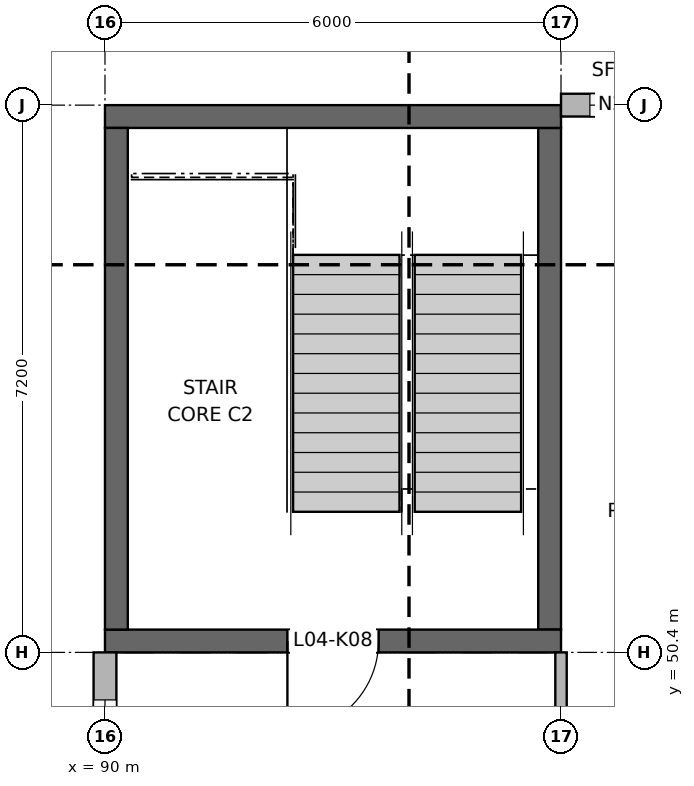
"""IFC4 building model, lengths in metres.
Left out: names, types, materials, properties, quantities, classifications, styles, units other than length and angle.
Written with IfcOpenShell. Run it as: python <this file> out.ifc"""

import sys

from ifc_helpers import new_model, si_unit, direction, frame, frame_2d, origin, place, context, subcontext, project, spatial, rectangle, extrude, element, fill, save


model = new_model("IFC4")
c1 = context("Model", 3, precision=1e-05, world=origin(), true_north=direction((0.0, 1.0)))
c2 = subcontext(c1, "Body", "Model", "MODEL_VIEW")
j1 = project(units=[si_unit("LENGTHUNIT", "METRE"), si_unit("PLANEANGLEUNIT", "RADIAN")], contexts=[c1])
p1 = place(None, origin())
s1 = spatial("IfcSite", under=j1, at=p1, CompositionType="ELEMENT")
p2 = place(p1, origin())
s2 = spatial("IfcBuilding", under=s1, at=p2, CompositionType="ELEMENT")
p3 = place(p2, frame((0.0, 0.0, 16.8)))
s3 = spatial("IfcBuildingStorey", under=s2, at=p3, CompositionType="ELEMENT", Elevation=16.8)
p4 = place(p3, frame((90.0, 50.55, 0.0), z_axis=(0.0, 0.0, 1.0), x_axis=(1.0, 0.0, 0.0)))
e1 = element("IfcWall", 1, at=p4, inside=s3, PredefinedType="SHEAR", context=c2, shape_type="SweptSolid", body=[
    extrude(rectangle(XDim=6.0, YDim=0.3, at=frame_2d((3.0, 0.0))), origin(), (0.0, 0.0, 1.0), 3.95),
])
p5 = place(p4, frame((2.4, 0.0, 0.0)))
e2 = element("IfcOpeningElement", 2, at=p5, cuts=e1, PredefinedType="OPENING", context=c2, shape_type="SweptSolid", body=[
    extrude(rectangle(XDim=1.2, YDim=2.1, at=frame_2d((0.6, 1.05))), frame((0.0, 0.16, 0.0), z_axis=(0.0, -1.0, 0.0), x_axis=(1.0, 0.0, 0.0)), (0.0, 0.0, 1.0), 0.32),
])
p6 = place(p3, frame((90.0, 57.45, 0.0), z_axis=(0.0, 0.0, 1.0), x_axis=(1.0, 0.0, 0.0)))
e3 = element("IfcWall", 3, at=p6, inside=s3, PredefinedType="SHEAR", context=c2, shape_type="SweptSolid", body=[
    extrude(rectangle(XDim=6.0, YDim=0.3, at=frame_2d((3.0, 0.0))), origin(), (0.0, 0.0, 1.0), 3.95),
])
for number, where, z_axis, x_axis in (
    (4, (90.15, 50.7, 0.0), (0.0, 0.0, 1.0), (0.0, 1.0, 0.0)),
    (5, (95.85, 50.7, 0.0), (0.0, 0.0, 1.0), (0.0, 1.0, 0.0)),
):
    element("IfcWall", number, at=place(p3, frame(where, z_axis=z_axis, x_axis=x_axis)), inside=s3, PredefinedType="SHEAR", context=c2, shape_type="SweptSolid", body=[
        extrude(rectangle(XDim=6.6, YDim=0.3, at=frame_2d((3.3, 0.0))), origin(), (0.0, 0.0, 1.0), 3.95),
    ])
p7 = place(p3, frame((90.0, 43.55, 0.0), z_axis=(0.0, 0.0, 1.0), x_axis=(0.0, 1.0, 0.0)))
e6 = element("IfcWall", 6, at=p7, inside=s3, PredefinedType="SOLIDWALL", context=c2, shape_type="SweptSolid", body=[
    extrude(rectangle(XDim=6.85, YDim=0.3, at=frame_2d((3.425, 0.0))), origin(), (0.0, 0.0, 1.0), 3.1),
])
p8 = place(p7, frame((2.275, 0.0, 0.9)))
e7 = element("IfcOpeningElement", 7, at=p8, cuts=e6, PredefinedType="OPENING", context=c2, shape_type="SweptSolid", body=[
    extrude(rectangle(XDim=0.9, YDim=1.2, at=frame_2d((0.45, 0.6))), frame((0.0, 0.16, 0.0), z_axis=(0.0, -1.0, 0.0), x_axis=(1.0, 0.0, 0.0)), (0.0, 0.0, 1.0), 0.32),
])
p9 = place(p7, frame((3.8, 0.0, 0.9)))
e8 = element("IfcOpeningElement", 8, at=p9, cuts=e6, PredefinedType="OPENING", context=c2, shape_type="SweptSolid", body=[
    extrude(rectangle(XDim=0.9, YDim=1.2, at=frame_2d((0.45, 0.6))), frame((0.0, 0.16, 0.0), z_axis=(0.0, -1.0, 0.0), x_axis=(1.0, 0.0, 0.0)), (0.0, 0.0, 1.0), 0.32),
])
p10 = place(p7, frame((5.325, 0.0, 0.9)))
e9 = element("IfcOpeningElement", 9, at=p10, cuts=e6, PredefinedType="OPENING", context=c2, shape_type="SweptSolid", body=[
    extrude(rectangle(XDim=0.9, YDim=1.2, at=frame_2d((0.45, 0.6))), frame((0.0, 0.16, 0.0), z_axis=(0.0, -1.0, 0.0), x_axis=(1.0, 0.0, 0.0)), (0.0, 0.0, 1.0), 0.32),
])
p11 = place(p3, frame((96.0, 57.6, 0.0), z_axis=(0.0, 0.0, 1.0), x_axis=(1.0, 0.0, 0.0)))
e10 = element("IfcWall", 10, at=p11, inside=s3, PredefinedType="SOLIDWALL", context=c2, shape_type="SweptSolid", body=[
    extrude(rectangle(XDim=5.65, YDim=0.3, at=frame_2d((2.825, 0.0))), origin(), (0.0, 0.0, 1.0), 3.2),
])
p12 = place(p11, frame((0.38, 0.0, 0.9)))
e11 = element("IfcOpeningElement", 11, at=p12, cuts=e10, PredefinedType="OPENING", context=c2, shape_type="SweptSolid", body=[
    extrude(rectangle(XDim=0.9, YDim=1.2, at=frame_2d((0.45, 0.6))), frame((0.0, 0.16, 0.0), z_axis=(0.0, -1.0, 0.0), x_axis=(1.0, 0.0, 0.0)), (0.0, 0.0, 1.0), 0.32),
])
p13 = place(p11, frame((1.66, 0.0, 0.9)))
e12 = element("IfcOpeningElement", 12, at=p13, cuts=e10, PredefinedType="OPENING", context=c2, shape_type="SweptSolid", body=[
    extrude(rectangle(XDim=0.9, YDim=1.2, at=frame_2d((0.45, 0.6))), frame((0.0, 0.16, 0.0), z_axis=(0.0, -1.0, 0.0), x_axis=(1.0, 0.0, 0.0)), (0.0, 0.0, 1.0), 0.32),
])
p14 = place(p11, frame((4.105, 0.0, 0.9)))
e13 = element("IfcOpeningElement", 13, at=p14, cuts=e10, PredefinedType="OPENING", context=c2, shape_type="SweptSolid", body=[
    extrude(rectangle(XDim=0.9, YDim=1.2, at=frame_2d((0.45, 0.6))), frame((0.0, 0.16, 0.0), z_axis=(0.0, -1.0, 0.0), x_axis=(1.0, 0.0, 0.0)), (0.0, 0.0, 1.0), 0.32),
])
p15 = place(p3, frame((96.0, 44.925, 0.0), z_axis=(0.0, 0.0, 1.0), x_axis=(0.0, 1.0, 0.0)))
e14 = element("IfcWall", 14, at=p15, inside=s3, PredefinedType="PARTITIONING", context=c2, shape_type="SweptSolid", body=[
    extrude(rectangle(XDim=5.475, YDim=0.15, at=frame_2d((2.737, 0.0))), origin(), (0.0, 0.0, 1.0), 4.0),
])
p16 = place(p15, frame((2.325, 0.0, 0.0)))
e15 = element("IfcOpeningElement", 15, at=p16, cuts=e14, PredefinedType="OPENING", context=c2, shape_type="SweptSolid", body=[
    extrude(rectangle(XDim=0.9, YDim=2.1, at=frame_2d((0.45, 1.05))), frame((0.0, 0.085, 0.0), z_axis=(0.0, -1.0, 0.0), x_axis=(1.0, 0.0, 0.0)), (0.0, 0.0, 1.0), 0.17),
])
p17 = place(p10, origin())
e16 = element("IfcWindow", 16, at=p17, inside=s3, PartitioningType="SINGLE_PANEL", PredefinedType="WINDOW", context=c2, shape_type="SweptSolid", body=[
    extrude(rectangle(XDim=0.9, YDim=1.2, at=frame_2d((0.45, 0.6))), frame((0.0, 0.03, 0.0), z_axis=(0.0, -1.0, 0.0), x_axis=(1.0, 0.0, 0.0)), (0.0, 0.0, 1.0), 0.06),
])
fill(e9, e16)
p18 = place(p12, origin())
e17 = element("IfcWindow", 17, at=p18, inside=s3, PartitioningType="SINGLE_PANEL", PredefinedType="WINDOW", context=c2, shape_type="SweptSolid", body=[
    extrude(rectangle(XDim=0.9, YDim=1.2, at=frame_2d((0.45, 0.6))), frame((0.0, 0.03, 0.0), z_axis=(0.0, -1.0, 0.0), x_axis=(1.0, 0.0, 0.0)), (0.0, 0.0, 1.0), 0.06),
])
fill(e11, e17)
p19 = place(p5, frame((1.2, 0.0, 0.0), z_axis=(0.0, 0.0, 1.0), x_axis=(-1.0, 0.0, 0.0)))
e18 = element("IfcDoor", 18, at=p19, inside=s3, OperationType="SINGLE_SWING_RIGHT", PredefinedType="DOOR", context=c2, shape_type="SweptSolid", body=[
    extrude(rectangle(XDim=1.2, YDim=2.1, at=frame_2d((0.6, 1.05))), frame((0.0, 0.025, 0.0), z_axis=(0.0, -1.0, 0.0), x_axis=(1.0, 0.0, 0.0)), (0.0, 0.0, 1.0), 0.05),
])
fill(e2, e18)
save(model, sys.argv[1])
